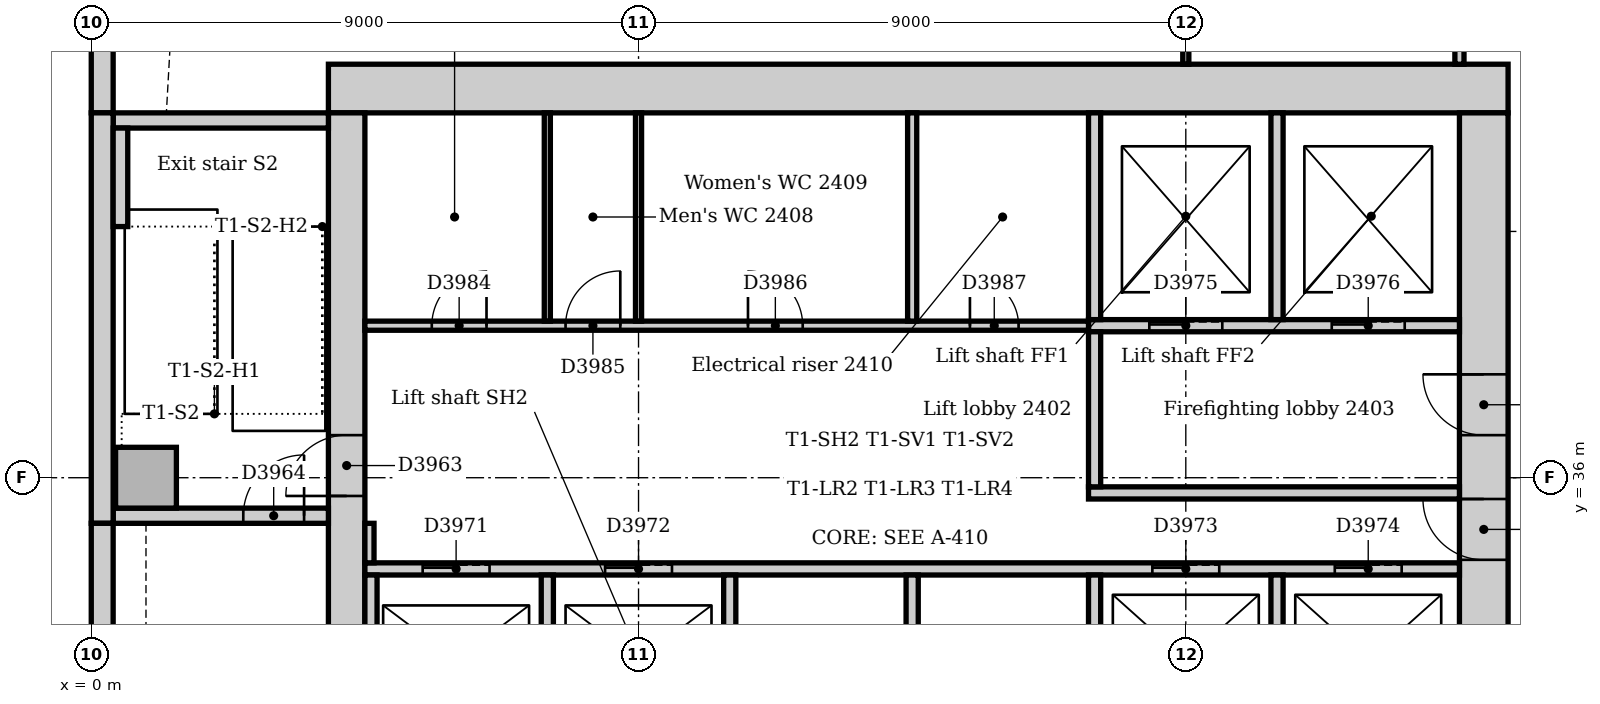
"""IFC4 building model, lengths in metres.
Left out: names, types, materials, properties, quantities, classifications, styles, units other than length and angle.
Written with IfcOpenShell. Run it as: python <this file> out.ifc"""

import sys

from ifc_helpers import new_model, si_unit, direction, frame, frame_2d, origin, origin_2d, place, context, subcontext, project, spatial, rectangle, extrude, element, fill, save


model = new_model("IFC4")
c1 = context("Model", 3, precision=1e-05, world=origin(), true_north=direction((0.0, 1.0)))
c2 = subcontext(c1, "Body", "Model", "MODEL_VIEW")
j1 = project(units=[si_unit("LENGTHUNIT", "METRE"), si_unit("PLANEANGLEUNIT", "RADIAN")], contexts=[c1])
p1 = place(None, origin())
s1 = spatial("IfcSite", under=j1, at=p1, CompositionType="ELEMENT")
p2 = place(p1, origin())
s2 = spatial("IfcBuilding", under=s1, at=p2, CompositionType="ELEMENT")
p3 = place(p2, frame((0.0, 0.0, 104.0)))
s3 = spatial("IfcBuildingStorey", under=s2, at=p3, CompositionType="ELEMENT", Elevation=104.0)
p4 = place(p3, frame((23.3, 42.4, 0.0), z_axis=(0.0, 0.0, 1.0), x_axis=(-1.0, 0.0, 0.0)))
e1 = element("IfcWall", 1, at=p4, inside=s3, PredefinedType="SOLIDWALL", context=c2, shape_type="SweptSolid", body=[
    extrude(rectangle(XDim=19.4, YDim=0.8, at=frame_2d((9.7, 0.0))), origin(), (0.0, 0.0, 1.0), 4.0),
])
p5 = place(p3, frame((22.9, 31.5, 0.0), z_axis=(0.0, 0.0, 1.0), x_axis=(0.0, 1.0, 0.0)))
e2 = element("IfcWall", 2, at=p5, inside=s3, PredefinedType="SOLIDWALL", context=c2, shape_type="SweptSolid", body=[
    extrude(rectangle(XDim=10.5, YDim=0.8, at=frame_2d((5.25, 0.0))), origin(), (0.0, 0.0, 1.0), 4.0),
])
p6 = place(p5, frame((3.15, 0.0, 0.0)))
e3 = element("IfcOpeningElement", 3, at=p6, cuts=e2, PredefinedType="OPENING", context=c2, shape_type="SweptSolid", body=[
    extrude(rectangle(XDim=1.0, YDim=2.1, at=frame_2d((0.5, 1.05))), frame((0.0, 0.41, 0.0), z_axis=(0.0, -1.0, 0.0), x_axis=(1.0, 0.0, 0.0)), (0.0, 0.0, 1.0), 0.82),
])
p7 = place(p5, frame((5.2, 0.0, 0.0)))
e4 = element("IfcOpeningElement", 4, at=p7, cuts=e2, PredefinedType="OPENING", context=c2, shape_type="SweptSolid", body=[
    extrude(rectangle(XDim=1.0, YDim=2.1, at=frame_2d((0.5, 1.05))), frame((0.0, 0.41, 0.0), z_axis=(0.0, -1.0, 0.0), x_axis=(1.0, 0.0, 0.0)), (0.0, 0.0, 1.0), 0.82),
])
p8 = place(p3, frame((4.2, 42.0, 0.0), z_axis=(0.0, 0.0, 1.0), x_axis=(0.0, -1.0, 0.0)))
e5 = element("IfcWall", 5, at=p8, inside=s3, PredefinedType="SOLIDWALL", context=c2, shape_type="SweptSolid", body=[
    extrude(rectangle(XDim=10.5, YDim=0.6, at=frame_2d((5.25, 0.0))), origin(), (0.0, 0.0, 1.0), 4.0),
])
p9 = place(p8, frame((5.3, 0.0, 0.0)))
e6 = element("IfcOpeningElement", 6, at=p9, cuts=e5, PredefinedType="OPENING", context=c2, shape_type="SweptSolid", body=[
    extrude(rectangle(XDim=1.0, YDim=2.1, at=frame_2d((0.5, 1.05))), frame((0.0, 0.31, 0.0), z_axis=(0.0, -1.0, 0.0), x_axis=(1.0, 0.0, 0.0)), (0.0, 0.0, 1.0), 0.62),
])
p10 = place(p3, frame((0.36, 35.375, 0.0), z_axis=(0.0, 0.0, 1.0), x_axis=(1.0, 0.0, 0.0)))
e7 = element("IfcWall", 7, at=p10, inside=s3, PredefinedType="SOLIDWALL", context=c2, shape_type="SweptSolid", body=[
    extrude(rectangle(XDim=3.54, YDim=0.25, at=frame_2d((1.77, 0.0))), origin(), (0.0, 0.0, 1.0), 4.0),
])
p11 = place(p10, frame((2.14, 0.0, 0.0)))
e8 = element("IfcOpeningElement", 8, at=p11, cuts=e7, PredefinedType="OPENING", context=c2, shape_type="SweptSolid", body=[
    extrude(rectangle(XDim=1.0, YDim=2.1, at=frame_2d((0.5, 1.05))), frame((0.0, 0.135, 0.0), z_axis=(0.0, -1.0, 0.0), x_axis=(1.0, 0.0, 0.0)), (0.0, 0.0, 1.0), 0.27),
])
p12 = place(p3, frame((3.9, 41.875, 0.0), z_axis=(0.0, 0.0, 1.0), x_axis=(-1.0, 0.0, 0.0)))
e9 = element("IfcWall", 9, at=p12, inside=s3, PredefinedType="SOLIDWALL", context=c2, shape_type="SweptSolid", body=[
    extrude(rectangle(XDim=3.54, YDim=0.25, at=frame_2d((1.77, 0.0))), origin(), (0.0, 0.0, 1.0), 4.0),
])
p13 = place(p3, frame((0.9, 36.0, 0.0), z_axis=(0.0, 0.0, 1.0), x_axis=(1.0, 0.0, 0.0)))
e10 = element("IfcColumn", 10, at=p13, inside=s3, PredefinedType="COLUMN", context=c2, shape_type="SweptSolid", body=[
    extrude(rectangle(XDim=1.0, YDim=1.0, at=origin_2d()), origin(), (0.0, 0.0, 1.0), 4.0),
])
p14 = place(p3, frame((0.18, 45.257, 0.0), z_axis=(0.0, 0.0, 1.0), x_axis=(0.0, -1.0, 0.0)))
e11 = element("IfcWall", 11, at=p14, inside=s3, PredefinedType="STANDARD", context=c2, shape_type="SweptSolid", body=[
    extrude(rectangle(XDim=3.257, YDim=0.36, at=frame_2d((1.629, 0.0))), origin(), (0.0, 0.0, 1.0), 3.85),
])
p15 = place(p3, frame((0.18, 42.0, 0.0), z_axis=(0.0, 0.0, 1.0), x_axis=(0.0, -1.0, 0.0)))
e12 = element("IfcWall", 12, at=p15, inside=s3, PredefinedType="STANDARD", context=c2, shape_type="SweptSolid", body=[
    extrude(rectangle(XDim=6.75, YDim=0.36, at=frame_2d((3.375, 0.0))), origin(), (0.0, 0.0, 1.0), 3.85),
])
p16 = place(p3, frame((0.18, 35.25, 0.0), z_axis=(0.0, 0.0, 1.0), x_axis=(0.0, -1.0, 0.0)))
e13 = element("IfcWall", 13, at=p16, inside=s3, PredefinedType="STANDARD", context=c2, shape_type="SweptSolid", body=[
    extrude(rectangle(XDim=7.5, YDim=0.36, at=frame_2d((3.75, 0.0))), origin(), (0.0, 0.0, 1.0), 3.85),
])
p17 = place(p3, frame((0.48, 40.13, 0.0), z_axis=(0.0, 0.0, 1.0), x_axis=(0.0, 1.0, 0.0)))
e14 = element("IfcWall", 14, at=p17, inside=s3, PredefinedType="STANDARD", context=c2, shape_type="SweptSolid", body=[
    extrude(rectangle(XDim=1.62, YDim=0.24, at=frame_2d((0.81, 0.0))), origin(), (0.0, 0.0, 1.0), 4.0),
])
p18 = place(p3, frame((16.4, 35.75, 0.0), z_axis=(0.0, 0.0, 1.0), x_axis=(1.0, 0.0, 0.0)))
e15 = element("IfcWall", 15, at=p18, inside=s3, PredefinedType="PARTITIONING", context=c2, shape_type="SweptSolid", body=[
    extrude(rectangle(XDim=6.1, YDim=0.2, at=frame_2d((3.05, 0.0))), origin(), (0.0, 0.0, 1.0), 3.85),
])
p19 = place(p3, frame((16.4, 38.5, 0.0), z_axis=(0.0, 0.0, 1.0), x_axis=(1.0, 0.0, 0.0)))
e16 = element("IfcWall", 16, at=p19, inside=s3, PredefinedType="PARTITIONING", context=c2, shape_type="SweptSolid", body=[
    extrude(rectangle(XDim=6.1, YDim=0.2, at=frame_2d((3.05, 0.0))), origin(), (0.0, 0.0, 1.0), 3.85),
])
p20 = place(p19, frame((1.0, 0.0, 0.0)))
e17 = element("IfcOpeningElement", 17, at=p20, cuts=e16, PredefinedType="OPENING", context=c2, shape_type="SweptSolid", body=[
    extrude(rectangle(XDim=1.2, YDim=2.1, at=frame_2d((0.6, 1.05))), frame((0.0, 0.11, 0.0), z_axis=(0.0, -1.0, 0.0), x_axis=(1.0, 0.0, 0.0)), (0.0, 0.0, 1.0), 0.22),
])
p21 = place(p19, frame((4.0, 0.0, 0.0)))
e18 = element("IfcOpeningElement", 18, at=p21, cuts=e16, PredefinedType="OPENING", context=c2, shape_type="SweptSolid", body=[
    extrude(rectangle(XDim=1.2, YDim=2.1, at=frame_2d((0.6, 1.05))), frame((0.0, 0.11, 0.0), z_axis=(0.0, -1.0, 0.0), x_axis=(1.0, 0.0, 0.0)), (0.0, 0.0, 1.0), 0.22),
])
p22 = place(p3, frame((16.5, 35.85, 0.0), z_axis=(0.0, 0.0, 1.0), x_axis=(0.0, 1.0, 0.0)))
e19 = element("IfcWall", 19, at=p22, inside=s3, PredefinedType="PARTITIONING", context=c2, shape_type="SweptSolid", body=[
    extrude(rectangle(XDim=2.55, YDim=0.2, at=frame_2d((1.275, 0.0))), origin(), (0.0, 0.0, 1.0), 3.85),
])
p23 = place(p3, frame((4.5, 34.5, 0.0), z_axis=(0.0, 0.0, 1.0), x_axis=(1.0, 0.0, 0.0)))
e20 = element("IfcWall", 20, at=p23, inside=s3, PredefinedType="PARTITIONING", context=c2, shape_type="SweptSolid", body=[
    extrude(rectangle(XDim=18.0, YDim=0.2, at=frame_2d((9.0, 0.0))), origin(), (0.0, 0.0, 1.0), 3.85),
])
p24 = place(p23, frame((0.95, 0.0, 0.0)))
e21 = element("IfcOpeningElement", 21, at=p24, cuts=e20, PredefinedType="OPENING", context=c2, shape_type="SweptSolid", body=[
    extrude(rectangle(XDim=1.1, YDim=2.1, at=frame_2d((0.55, 1.05))), frame((0.0, 0.11, 0.0), z_axis=(0.0, -1.0, 0.0), x_axis=(1.0, 0.0, 0.0)), (0.0, 0.0, 1.0), 0.22),
])
p25 = place(p23, frame((3.95, 0.0, 0.0)))
e22 = element("IfcOpeningElement", 22, at=p25, cuts=e20, PredefinedType="OPENING", context=c2, shape_type="SweptSolid", body=[
    extrude(rectangle(XDim=1.1, YDim=2.1, at=frame_2d((0.55, 1.05))), frame((0.0, 0.11, 0.0), z_axis=(0.0, -1.0, 0.0), x_axis=(1.0, 0.0, 0.0)), (0.0, 0.0, 1.0), 0.22),
])
p26 = place(p23, frame((12.95, 0.0, 0.0)))
e23 = element("IfcOpeningElement", 23, at=p26, cuts=e20, PredefinedType="OPENING", context=c2, shape_type="SweptSolid", body=[
    extrude(rectangle(XDim=1.1, YDim=2.1, at=frame_2d((0.55, 1.05))), frame((0.0, 0.11, 0.0), z_axis=(0.0, -1.0, 0.0), x_axis=(1.0, 0.0, 0.0)), (0.0, 0.0, 1.0), 0.22),
])
p27 = place(p23, frame((15.95, 0.0, 0.0)))
e24 = element("IfcOpeningElement", 24, at=p27, cuts=e20, PredefinedType="OPENING", context=c2, shape_type="SweptSolid", body=[
    extrude(rectangle(XDim=1.1, YDim=2.1, at=frame_2d((0.55, 1.05))), frame((0.0, 0.11, 0.0), z_axis=(0.0, -1.0, 0.0), x_axis=(1.0, 0.0, 0.0)), (0.0, 0.0, 1.0), 0.22),
])
for number, where, z_axis, x_axis in (
    (25, (16.5, 38.6, 0.0), (0.0, 0.0, 1.0), (0.0, 1.0, 0.0)),
    (26, (19.5, 38.6, 0.0), (0.0, 0.0, 1.0), (0.0, 1.0, 0.0)),
):
    element("IfcWall", number, at=place(p3, frame(where, z_axis=z_axis, x_axis=x_axis)), inside=s3, PredefinedType="PARTITIONING", context=c2, shape_type="SweptSolid", body=[
        extrude(rectangle(XDim=3.4, YDim=0.2, at=frame_2d((1.7, 0.0))), origin(), (0.0, 0.0, 1.0), 3.85),
    ])
for number, where, z_axis, x_axis in (
    (27, (4.6, 31.75, 0.0), (0.0, 0.0, 1.0), (0.0, 1.0, 0.0)),
    (28, (7.5, 31.75, 0.0), (0.0, 0.0, 1.0), (0.0, 1.0, 0.0)),
    (29, (10.5, 31.75, 0.0), (0.0, 0.0, 1.0), (0.0, 1.0, 0.0)),
    (30, (13.5, 31.75, 0.0), (0.0, 0.0, 1.0), (0.0, 1.0, 0.0)),
    (31, (16.5, 31.75, 0.0), (0.0, 0.0, 1.0), (0.0, 1.0, 0.0)),
    (32, (19.5, 31.75, 0.0), (0.0, 0.0, 1.0), (0.0, 1.0, 0.0)),
):
    element("IfcWall", number, at=place(p3, frame(where, z_axis=z_axis, x_axis=x_axis)), inside=s3, PredefinedType="PARTITIONING", context=c2, shape_type="SweptSolid", body=[
        extrude(rectangle(XDim=2.65, YDim=0.2, at=frame_2d((1.325, 0.0))), origin(), (0.0, 0.0, 1.0), 3.85),
    ])
p28 = place(p3, frame((4.5, 38.5, 0.0), z_axis=(0.0, 0.0, 1.0), x_axis=(1.0, 0.0, 0.0)))
e33 = element("IfcWall", 33, at=p28, inside=s3, PredefinedType="PARTITIONING", context=c2, shape_type="SweptSolid", body=[
    extrude(rectangle(XDim=11.9, YDim=0.15, at=frame_2d((5.95, 0.0))), origin(), (0.0, 0.0, 1.0), 3.85),
])
p29 = place(p28, frame((1.1, 0.0, 0.0)))
e34 = element("IfcOpeningElement", 34, at=p29, cuts=e33, PredefinedType="OPENING", context=c2, shape_type="SweptSolid", body=[
    extrude(rectangle(XDim=0.9, YDim=2.1, at=frame_2d((0.45, 1.05))), frame((0.0, 0.085, 0.0), z_axis=(0.0, -1.0, 0.0), x_axis=(1.0, 0.0, 0.0)), (0.0, 0.0, 1.0), 0.17),
])
p30 = place(p28, frame((3.3, 0.0, 0.0)))
e35 = element("IfcOpeningElement", 35, at=p30, cuts=e33, PredefinedType="OPENING", context=c2, shape_type="SweptSolid", body=[
    extrude(rectangle(XDim=0.9, YDim=2.1, at=frame_2d((0.45, 1.05))), frame((0.0, 0.085, 0.0), z_axis=(0.0, -1.0, 0.0), x_axis=(1.0, 0.0, 0.0)), (0.0, 0.0, 1.0), 0.17),
])
p31 = place(p28, frame((6.3, 0.0, 0.0)))
e36 = element("IfcOpeningElement", 36, at=p31, cuts=e33, PredefinedType="OPENING", context=c2, shape_type="SweptSolid", body=[
    extrude(rectangle(XDim=0.9, YDim=2.1, at=frame_2d((0.45, 1.05))), frame((0.0, 0.085, 0.0), z_axis=(0.0, -1.0, 0.0), x_axis=(1.0, 0.0, 0.0)), (0.0, 0.0, 1.0), 0.17),
])
p32 = place(p28, frame((9.95, 0.0, 0.0)))
e37 = element("IfcOpeningElement", 37, at=p32, cuts=e33, PredefinedType="OPENING", context=c2, shape_type="SweptSolid", body=[
    extrude(rectangle(XDim=0.8, YDim=2.1, at=frame_2d((0.4, 1.05))), frame((0.0, 0.085, 0.0), z_axis=(0.0, -1.0, 0.0), x_axis=(1.0, 0.0, 0.0)), (0.0, 0.0, 1.0), 0.17),
])
p33 = place(p3, frame((22.5, 42.8, 0.0), z_axis=(0.0, 0.0, 1.0), x_axis=(0.0, 1.0, 0.0)))
e38 = element("IfcWall", 38, at=p33, inside=s3, PredefinedType="PARTITIONING", context=c2, shape_type="SweptSolid", body=[
    extrude(rectangle(XDim=6.34, YDim=0.15, at=frame_2d((3.17, 0.0))), origin(), (0.0, 0.0, 1.0), 3.85),
])
p34 = place(p33, frame((3.7, 0.0, 0.0)))
e39 = element("IfcOpeningElement", 39, at=p34, cuts=e38, PredefinedType="OPENING", context=c2, shape_type="SweptSolid", body=[
    extrude(rectangle(XDim=1.0, YDim=2.1, at=frame_2d((0.5, 1.05))), frame((0.0, 0.085, 0.0), z_axis=(0.0, -1.0, 0.0), x_axis=(1.0, 0.0, 0.0)), (0.0, 0.0, 1.0), 0.17),
])
p35 = place(p3, frame((4.575, 34.6, 0.0), z_axis=(0.0, 0.0, 1.0), x_axis=(0.0, 1.0, 0.0)))
e40 = element("IfcWall", 40, at=p35, inside=s3, PredefinedType="PARTITIONING", context=c2, shape_type="SweptSolid", body=[
    extrude(rectangle(XDim=0.65, YDim=0.15, at=frame_2d((0.325, 0.0))), origin(), (0.0, 0.0, 1.0), 3.85),
])
p36 = place(p3, frame((13.5, 38.575, 0.0), z_axis=(0.0, 0.0, 1.0), x_axis=(0.0, 1.0, 0.0)))
e41 = element("IfcWall", 41, at=p36, inside=s3, PredefinedType="PARTITIONING", context=c2, shape_type="SweptSolid", body=[
    extrude(rectangle(XDim=3.425, YDim=0.15, at=frame_2d((1.712, 0.0))), origin(), (0.0, 0.0, 1.0), 3.85),
])
p37 = place(p3, frame((18.0, 42.8, 0.0), z_axis=(0.0, 0.0, 1.0), x_axis=(0.0, 1.0, 0.0)))
e42 = element("IfcWall", 42, at=p37, inside=s3, PredefinedType="PARTITIONING", context=c2, shape_type="SweptSolid", body=[
    extrude(rectangle(XDim=0.8, YDim=0.1, at=frame_2d((0.4, 0.0))), origin(), (0.0, 0.0, 1.0), 3.85),
])
for number, where, z_axis, x_axis in (
    (43, (7.5, 38.575, 0.0), (0.0, 0.0, 1.0), (0.0, 1.0, 0.0)),
    (44, (9.0, 38.575, 0.0), (0.0, 0.0, 1.0), (0.0, 1.0, 0.0)),
):
    element("IfcWall", number, at=place(p3, frame(where, z_axis=z_axis, x_axis=x_axis)), inside=s3, PredefinedType="PARTITIONING", context=c2, shape_type="SweptSolid", body=[
        extrude(rectangle(XDim=3.425, YDim=0.1, at=frame_2d((1.712, 0.0))), origin(), (0.0, 0.0, 1.0), 3.85),
    ])
p38 = place(p9, frame((1.0, 0.0, 0.0), z_axis=(0.0, 0.0, 1.0), x_axis=(-1.0, 0.0, 0.0)))
e45 = element("IfcDoor", 45, at=p38, inside=s3, OperationType="SINGLE_SWING_LEFT", PredefinedType="DOOR", context=c2, shape_type="SweptSolid", body=[
    extrude(rectangle(XDim=1.0, YDim=2.1, at=frame_2d((0.5, 1.05))), frame((0.0, 0.025, 0.0), z_axis=(0.0, -1.0, 0.0), x_axis=(1.0, 0.0, 0.0)), (0.0, 0.0, 1.0), 0.05),
])
fill(e6, e45)
p39 = place(p11, origin())
e46 = element("IfcDoor", 46, at=p39, inside=s3, OperationType="SINGLE_SWING_RIGHT", PredefinedType="DOOR", context=c2, shape_type="SweptSolid", body=[
    extrude(rectangle(XDim=1.0, YDim=2.1, at=frame_2d((0.5, 1.05))), frame((0.0, 0.025, 0.0), z_axis=(0.0, -1.0, 0.0), x_axis=(1.0, 0.0, 0.0)), (0.0, 0.0, 1.0), 0.05),
])
fill(e8, e46)
p40 = place(p24, origin())
e47 = element("IfcDoor", 47, at=p40, inside=s3, OperationType="SLIDING_TO_LEFT", PredefinedType="DOOR", context=c2, shape_type="SweptSolid", body=[
    extrude(rectangle(XDim=1.1, YDim=2.1, at=frame_2d((0.55, 1.05))), frame((0.0, 0.025, 0.0), z_axis=(0.0, -1.0, 0.0), x_axis=(1.0, 0.0, 0.0)), (0.0, 0.0, 1.0), 0.05),
])
fill(e21, e47)
p41 = place(p25, origin())
e48 = element("IfcDoor", 48, at=p41, inside=s3, OperationType="SLIDING_TO_LEFT", PredefinedType="DOOR", context=c2, shape_type="SweptSolid", body=[
    extrude(rectangle(XDim=1.1, YDim=2.1, at=frame_2d((0.55, 1.05))), frame((0.0, 0.025, 0.0), z_axis=(0.0, -1.0, 0.0), x_axis=(1.0, 0.0, 0.0)), (0.0, 0.0, 1.0), 0.05),
])
fill(e22, e48)
p42 = place(p26, origin())
e49 = element("IfcDoor", 49, at=p42, inside=s3, OperationType="SLIDING_TO_LEFT", PredefinedType="DOOR", context=c2, shape_type="SweptSolid", body=[
    extrude(rectangle(XDim=1.1, YDim=2.1, at=frame_2d((0.55, 1.05))), frame((0.0, 0.025, 0.0), z_axis=(0.0, -1.0, 0.0), x_axis=(1.0, 0.0, 0.0)), (0.0, 0.0, 1.0), 0.05),
])
fill(e23, e49)
p43 = place(p27, origin())
e50 = element("IfcDoor", 50, at=p43, inside=s3, OperationType="SLIDING_TO_LEFT", PredefinedType="DOOR", context=c2, shape_type="SweptSolid", body=[
    extrude(rectangle(XDim=1.1, YDim=2.1, at=frame_2d((0.55, 1.05))), frame((0.0, 0.025, 0.0), z_axis=(0.0, -1.0, 0.0), x_axis=(1.0, 0.0, 0.0)), (0.0, 0.0, 1.0), 0.05),
])
fill(e24, e50)
p44 = place(p20, origin())
e51 = element("IfcDoor", 51, at=p44, inside=s3, OperationType="SLIDING_TO_LEFT", PredefinedType="DOOR", context=c2, shape_type="SweptSolid", body=[
    extrude(rectangle(XDim=1.2, YDim=2.1, at=frame_2d((0.6, 1.05))), frame((0.0, 0.025, 0.0), z_axis=(0.0, -1.0, 0.0), x_axis=(1.0, 0.0, 0.0)), (0.0, 0.0, 1.0), 0.05),
])
fill(e17, e51)
p45 = place(p21, origin())
e52 = element("IfcDoor", 52, at=p45, inside=s3, OperationType="SLIDING_TO_LEFT", PredefinedType="DOOR", context=c2, shape_type="SweptSolid", body=[
    extrude(rectangle(XDim=1.2, YDim=2.1, at=frame_2d((0.6, 1.05))), frame((0.0, 0.025, 0.0), z_axis=(0.0, -1.0, 0.0), x_axis=(1.0, 0.0, 0.0)), (0.0, 0.0, 1.0), 0.05),
])
fill(e18, e52)
p46 = place(p6, origin())
e53 = element("IfcDoor", 53, at=p46, inside=s3, OperationType="SINGLE_SWING_RIGHT", PredefinedType="DOOR", context=c2, shape_type="SweptSolid", body=[
    extrude(rectangle(XDim=1.0, YDim=2.1, at=frame_2d((0.5, 1.05))), frame((0.0, 0.025, 0.0), z_axis=(0.0, -1.0, 0.0), x_axis=(1.0, 0.0, 0.0)), (0.0, 0.0, 1.0), 0.05),
])
fill(e3, e53)
p47 = place(p7, origin())
e54 = element("IfcDoor", 54, at=p47, inside=s3, OperationType="SINGLE_SWING_RIGHT", PredefinedType="DOOR", context=c2, shape_type="SweptSolid", body=[
    extrude(rectangle(XDim=1.0, YDim=2.1, at=frame_2d((0.5, 1.05))), frame((0.0, 0.025, 0.0), z_axis=(0.0, -1.0, 0.0), x_axis=(1.0, 0.0, 0.0)), (0.0, 0.0, 1.0), 0.05),
])
fill(e4, e54)
p48 = place(p29, origin())
e55 = element("IfcDoor", 55, at=p48, inside=s3, OperationType="SINGLE_SWING_RIGHT", PredefinedType="DOOR", context=c2, shape_type="SweptSolid", body=[
    extrude(rectangle(XDim=0.9, YDim=2.1, at=frame_2d((0.45, 1.05))), frame((0.0, 0.025, 0.0), z_axis=(0.0, -1.0, 0.0), x_axis=(1.0, 0.0, 0.0)), (0.0, 0.0, 1.0), 0.05),
])
fill(e34, e55)
p49 = place(p30, origin())
e56 = element("IfcDoor", 56, at=p49, inside=s3, OperationType="SINGLE_SWING_RIGHT", PredefinedType="DOOR", context=c2, shape_type="SweptSolid", body=[
    extrude(rectangle(XDim=0.9, YDim=2.1, at=frame_2d((0.45, 1.05))), frame((0.0, 0.025, 0.0), z_axis=(0.0, -1.0, 0.0), x_axis=(1.0, 0.0, 0.0)), (0.0, 0.0, 1.0), 0.05),
])
fill(e35, e56)
p50 = place(p31, origin())
e57 = element("IfcDoor", 57, at=p50, inside=s3, OperationType="SINGLE_SWING_LEFT", PredefinedType="DOOR", context=c2, shape_type="SweptSolid", body=[
    extrude(rectangle(XDim=0.9, YDim=2.1, at=frame_2d((0.45, 1.05))), frame((0.0, 0.025, 0.0), z_axis=(0.0, -1.0, 0.0), x_axis=(1.0, 0.0, 0.0)), (0.0, 0.0, 1.0), 0.05),
])
fill(e36, e57)
p51 = place(p32, origin())
e58 = element("IfcDoor", 58, at=p51, inside=s3, OperationType="SINGLE_SWING_LEFT", PredefinedType="DOOR", context=c2, shape_type="SweptSolid", body=[
    extrude(rectangle(XDim=0.8, YDim=2.1, at=frame_2d((0.4, 1.05))), frame((0.0, 0.025, 0.0), z_axis=(0.0, -1.0, 0.0), x_axis=(1.0, 0.0, 0.0)), (0.0, 0.0, 1.0), 0.05),
])
fill(e37, e58)
save(model, sys.argv[1])
